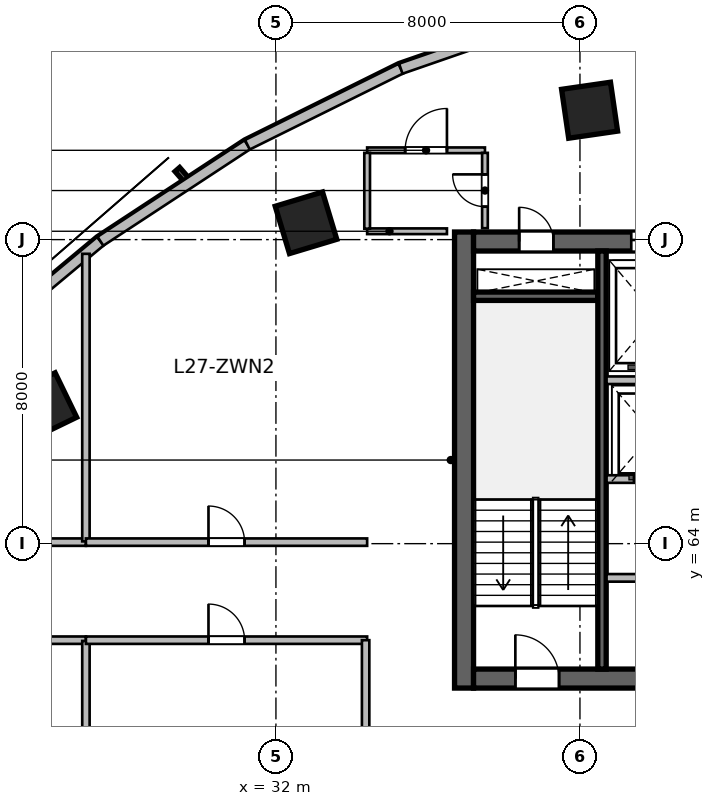
"""IFC4 building model, lengths in metres.
Left out: names, types, materials, properties, quantities, classifications, styles, units other than length and angle.
Written with IfcOpenShell. Run it as: python <this file> out.ifc"""

import sys

from ifc_helpers import new_model, si_unit, direction, frame, frame_2d, origin, origin_2d, place, context, subcontext, project, spatial, rectangle, extrude, source, transform, mapped, element, fill, save


model = new_model("IFC4")
c1 = context("Model", 3, precision=1e-05, world=origin(), true_north=direction((0.0, 1.0)))
c2 = subcontext(c1, "Body", "Model", "MODEL_VIEW")
j1 = project(units=[si_unit("LENGTHUNIT", "METRE"), si_unit("PLANEANGLEUNIT", "RADIAN")], contexts=[c1])
p1 = place(None, origin())
s1 = spatial("IfcSite", under=j1, at=p1, CompositionType="ELEMENT")
p2 = place(p1, origin())
s2 = spatial("IfcBuilding", under=s1, at=p2, CompositionType="ELEMENT")
p3 = place(p2, frame((0.0, 0.0, 115.5)))
s3 = spatial("IfcBuildingStorey", under=s2, at=p3, CompositionType="ELEMENT", Elevation=115.5)
m1 = source(origin(), c2, "Body", "SweptSolid", [
    extrude(rectangle(XDim=12.0, YDim=0.5, at=frame_2d((6.0, 0.0))), origin(), (0.0, 0.0, 1.0), 3.9),
])
p4 = place(p3, frame((36.95, 60.2, 0.0), z_axis=(0.0, 0.0, 1.0), x_axis=(0.0, 1.0, 0.0)))
e1 = element("IfcWall", 1, at=p4, inside=s3, PredefinedType="SHEAR", context=c2, shape_type="MappedRepresentation", body=[
    mapped(m1, transform((0.0, 0.0, 0.0), scale=1.0)),
])
m2 = source(origin(), c2, "Body", "SweptSolid", [
    extrude(rectangle(XDim=21.6, YDim=0.5, at=frame_2d((10.8, 0.0))), origin(), (0.0, 0.0, 1.0), 3.9),
])
p5 = place(p3, frame((37.2, 60.45, 0.0), z_axis=(0.0, 0.0, 1.0), x_axis=(1.0, 0.0, 0.0)))
e2 = element("IfcWall", 2, at=p5, inside=s3, PredefinedType="SHEAR", context=c2, shape_type="MappedRepresentation", body=[
    mapped(m2, transform((0.0, 0.0, 0.0), scale=1.0)),
])
p6 = place(p5, frame((1.1, 0.0, 0.0)))
e3 = element("IfcOpeningElement", 3, at=p6, cuts=e2, PredefinedType="OPENING", context=c2, shape_type="SweptSolid", body=[
    extrude(rectangle(XDim=1.15, YDim=2.15, at=frame_2d((0.575, 1.075))), frame((0.0, 0.26, 0.0), z_axis=(0.0, -1.0, 0.0), x_axis=(1.0, 0.0, 0.0)), (0.0, 0.0, 1.0), 0.52),
])
p7 = place(p5, frame((19.5, 0.0, 0.0)))
e4 = element("IfcOpeningElement", 4, at=p7, cuts=e2, PredefinedType="OPENING", context=c2, shape_type="SweptSolid", body=[
    extrude(rectangle(XDim=0.9, YDim=2.1, at=frame_2d((0.45, 1.05))), frame((0.0, 0.26, 0.0), z_axis=(0.0, -1.0, 0.0), x_axis=(1.0, 0.0, 0.0)), (0.0, 0.0, 1.0), 0.52),
])
p8 = place(p5, frame((12.02, 0.0, 0.0)))
e5 = element("IfcOpeningElement", 5, at=p8, cuts=e2, PredefinedType="OPENING", context=c2, shape_type="SweptSolid", body=[
    extrude(rectangle(XDim=1.6, YDim=2.15, at=frame_2d((0.8, 1.075))), frame((0.0, 0.26, 0.0), z_axis=(0.0, -1.0, 0.0), x_axis=(1.0, 0.0, 0.0)), (0.0, 0.0, 1.0), 0.52),
])
p9 = place(p3, frame((37.2, 71.95, 0.0), z_axis=(0.0, 0.0, 1.0), x_axis=(1.0, 0.0, 0.0)))
e6 = element("IfcWall", 6, at=p9, inside=s3, PredefinedType="SHEAR", context=c2, shape_type="MappedRepresentation", body=[
    mapped(m2, transform((0.0, 0.0, 0.0), scale=1.0)),
])
p10 = place(p9, frame((1.2, 0.0, 0.0)))
e7 = element("IfcOpeningElement", 7, at=p10, cuts=e6, PredefinedType="OPENING", context=c2, shape_type="SweptSolid", body=[
    extrude(rectangle(XDim=0.9, YDim=2.1, at=frame_2d((0.45, 1.05))), frame((0.0, 0.26, 0.0), z_axis=(0.0, -1.0, 0.0), x_axis=(1.0, 0.0, 0.0)), (0.0, 0.0, 1.0), 0.52),
])
p11 = place(p9, frame((14.7, 0.0, 0.0)))
e8 = element("IfcOpeningElement", 8, at=p11, cuts=e6, PredefinedType="OPENING", context=c2, shape_type="SweptSolid", body=[
    extrude(rectangle(XDim=1.2, YDim=2.15, at=frame_2d((0.6, 1.075))), frame((0.0, 0.26, 0.0), z_axis=(0.0, -1.0, 0.0), x_axis=(1.0, 0.0, 0.0)), (0.0, 0.0, 1.0), 0.52),
])
p12 = place(p9, frame((4.15, 0.0, 0.0)))
e9 = element("IfcOpeningElement", 9, at=p12, cuts=e6, PredefinedType="OPENING", context=c2, shape_type="SweptSolid", body=[
    extrude(rectangle(XDim=1.3, YDim=2.15, at=frame_2d((0.65, 1.075))), frame((0.0, 0.26, 0.0), z_axis=(0.0, -1.0, 0.0), x_axis=(1.0, 0.0, 0.0)), (0.0, 0.0, 1.0), 0.52),
])
p13 = place(p9, frame((6.76, 0.0, 0.0)))
e10 = element("IfcOpeningElement", 10, at=p13, cuts=e6, PredefinedType="OPENING", context=c2, shape_type="SweptSolid", body=[
    extrude(rectangle(XDim=0.85, YDim=2.1, at=frame_2d((0.425, 1.05))), frame((0.0, 0.26, 0.0), z_axis=(0.0, -1.0, 0.0), x_axis=(1.0, 0.0, 0.0)), (0.0, 0.0, 1.0), 0.52),
])
p14 = place(p9, frame((8.76, 0.0, 0.0)))
e11 = element("IfcOpeningElement", 11, at=p14, cuts=e6, PredefinedType="OPENING", context=c2, shape_type="SweptSolid", body=[
    extrude(rectangle(XDim=0.85, YDim=2.1, at=frame_2d((0.425, 1.05))), frame((0.0, 0.26, 0.0), z_axis=(0.0, -1.0, 0.0), x_axis=(1.0, 0.0, 0.0)), (0.0, 0.0, 1.0), 0.52),
])
p15 = place(p9, frame((10.725, 0.0, 0.0)))
e12 = element("IfcOpeningElement", 12, at=p15, cuts=e6, PredefinedType="OPENING", context=c2, shape_type="SweptSolid", body=[
    extrude(rectangle(XDim=0.85, YDim=2.1, at=frame_2d((0.425, 1.05))), frame((0.0, 0.26, 0.0), z_axis=(0.0, -1.0, 0.0), x_axis=(1.0, 0.0, 0.0)), (0.0, 0.0, 1.0), 0.52),
])
m3 = source(origin(), c2, "Body", "SweptSolid", [
    extrude(rectangle(XDim=3.27, YDim=0.22, at=frame_2d((1.635, 0.0))), origin(), (0.0, 0.0, 1.0), 3.9),
])
p16 = place(p3, frame((37.2, 70.51, 0.0), z_axis=(0.0, 0.0, 1.0), x_axis=(1.0, 0.0, 0.0)))
e13 = element("IfcWall", 13, at=p16, inside=s3, PredefinedType="SHEAR", context=c2, shape_type="MappedRepresentation", body=[
    mapped(m3, transform((0.0, 0.0, 0.0), scale=1.0)),
])
m4 = source(origin(), c2, "Body", "SweptSolid", [
    extrude(rectangle(XDim=11.0, YDim=0.22, at=frame_2d((5.5, 0.0))), origin(), (0.0, 0.0, 1.0), 3.9),
])
p17 = place(p3, frame((40.58, 60.7, 0.0), z_axis=(0.0, 0.0, 1.0), x_axis=(0.0, 1.0, 0.0)))
e14 = element("IfcWall", 14, at=p17, inside=s3, PredefinedType="SHEAR", context=c2, shape_type="MappedRepresentation", body=[
    mapped(m4, transform((0.0, 0.0, 0.0), scale=1.0)),
])
m5 = source(origin(), c2, "Body", "SweptSolid", [
    extrude(rectangle(XDim=1.3, YDim=1.3, at=origin_2d()), origin(), (0.0, 0.0, 1.0), 3.9),
])
for number, where, z_axis, x_axis in (
    (15, (25.888, 67.627, 0.0), (0.0, 0.0, 1.0), (-0.436, 0.9, 0.0)),
    (16, (32.791, 72.442, 0.0), (0.0, 0.0, 1.0), (-0.289, 0.957, 0.0)),
    (17, (40.253, 75.404, 0.0), (0.0, 0.0, 1.0), (-0.143, 0.99, 0.0)),
):
    element("IfcColumn", number, at=place(p3, frame(where, z_axis=z_axis, x_axis=x_axis)), inside=s3, PredefinedType="COLUMN", context=c2, shape_type="MappedRepresentation", body=[
        mapped(m5, transform((0.0, 0.0, 0.0), scale=1.0)),
    ])
m6 = source(origin(), c2, "Body", "SweptSolid", [
    extrude(rectangle(XDim=4.762, YDim=0.28, at=frame_2d((2.381, 0.0))), origin(), (0.0, 0.0, 1.0), 3.65),
])
p18 = place(p3, frame((23.725, 68.907, 0.0), z_axis=(0.0, 0.0, 1.0), x_axis=(0.767952279762, 0.640507061638, 0.0)))
e18 = element("IfcWall", 18, at=p18, inside=s3, PredefinedType="SOLIDWALL", context=c2, shape_type="MappedRepresentation", body=[
    mapped(m6, transform((0.0, 0.0, 0.0), scale=1.0)),
])
m7 = source(origin(), c2, "Body", "SweptSolid", [
    extrude(rectangle(XDim=4.626, YDim=0.28, at=frame_2d((2.313, 0.0))), origin(), (0.0, 0.0, 1.0), 3.65),
])
p19 = place(p3, frame((27.382, 71.958, 0.0), z_axis=(0.0, 0.0, 1.0), x_axis=(0.83595938331, 0.548791316855, 0.0)))
e19 = element("IfcWall", 19, at=p19, inside=s3, PredefinedType="SOLIDWALL", context=c2, shape_type="MappedRepresentation", body=[
    mapped(m7, transform((0.0, 0.0, 0.0), scale=1.0)),
])
m8 = source(origin(), c2, "Body", "SweptSolid", [
    extrude(rectangle(XDim=4.506, YDim=0.28, at=frame_2d((2.253, 0.0))), origin(), (0.0, 0.0, 1.0), 3.65),
])
p20 = place(p3, frame((31.249, 74.496, 0.0), z_axis=(0.0, 0.0, 1.0), x_axis=(0.89597155075, 0.444111450254, 0.0)))
e20 = element("IfcWall", 20, at=p20, inside=s3, PredefinedType="SOLIDWALL", context=c2, shape_type="MappedRepresentation", body=[
    mapped(m8, transform((0.0, 0.0, 0.0), scale=1.0)),
])
m9 = source(origin(), c2, "Body", "SweptSolid", [
    extrude(rectangle(XDim=4.409, YDim=0.28, at=frame_2d((2.205, 0.0))), origin(), (0.0, 0.0, 1.0), 3.65),
])
p21 = place(p3, frame((35.286, 76.497, 0.0), z_axis=(0.0, 0.0, 1.0), x_axis=(0.944879374121, 0.327418643881, 0.0)))
e21 = element("IfcWall", 21, at=p21, inside=s3, PredefinedType="SOLIDWALL", context=c2, shape_type="MappedRepresentation", body=[
    mapped(m9, transform((0.0, 0.0, 0.0), scale=1.0)),
])
m10 = source(origin(), c2, "Body", "SweptSolid", [
    extrude(rectangle(XDim=8.8, YDim=0.2, at=frame_2d((4.4, 0.0))), origin(), (0.0, 0.0, 1.0), 3.65),
])
p22 = place(p3, frame((40.7, 68.3, 0.0), z_axis=(0.0, 0.0, 1.0), x_axis=(1.0, 0.0, 0.0)))
e22 = element("IfcWall", 22, at=p22, inside=s3, PredefinedType="SOLIDWALL", context=c2, shape_type="MappedRepresentation", body=[
    mapped(m10, transform((0.0, 0.0, 0.0), scale=1.0)),
])
m11 = source(origin(), c2, "Body", "SweptSolid", [
    extrude(rectangle(XDim=8.02, YDim=0.2, at=frame_2d((4.01, 0.0))), origin(), (0.0, 0.0, 1.0), 3.65),
])
p23 = place(p3, frame((40.7, 63.1, 0.0), z_axis=(0.0, 0.0, 1.0), x_axis=(1.0, 0.0, 0.0)))
e23 = element("IfcWall", 23, at=p23, inside=s3, PredefinedType="SOLIDWALL", context=c2, shape_type="MappedRepresentation", body=[
    mapped(m11, transform((0.0, 0.0, 0.0), scale=1.0)),
])
p24 = place(p23, frame((2.15, 0.0, 0.0)))
e24 = element("IfcOpeningElement", 24, at=p24, cuts=e23, PredefinedType="OPENING", context=c2, shape_type="SweptSolid", body=[
    extrude(rectangle(XDim=0.9, YDim=2.1, at=frame_2d((0.45, 1.05))), frame((0.0, 0.11, 0.0), z_axis=(0.0, -1.0, 0.0), x_axis=(1.0, 0.0, 0.0)), (0.0, 0.0, 1.0), 0.22),
])
p25 = place(p23, frame((6.09, 0.0, 0.0)))
e25 = element("IfcOpeningElement", 25, at=p25, cuts=e23, PredefinedType="OPENING", context=c2, shape_type="SweptSolid", body=[
    extrude(rectangle(XDim=0.9, YDim=2.1, at=frame_2d((0.45, 1.05))), frame((0.0, 0.11, 0.0), z_axis=(0.0, -1.0, 0.0), x_axis=(1.0, 0.0, 0.0)), (0.0, 0.0, 1.0), 0.22),
])
p26 = place(p3, frame((40.7, 65.7, 0.0), z_axis=(0.0, 0.0, 1.0), x_axis=(1.0, 0.0, 0.0)))
e26 = element("IfcWall", 26, at=p26, inside=s3, PredefinedType="SOLIDWALL", context=c2, shape_type="MappedRepresentation", body=[
    mapped(m10, transform((0.0, 0.0, 0.0), scale=1.0)),
])
p27 = place(p26, frame((0.72, 0.0, 0.0)))
e27 = element("IfcOpeningElement", 27, at=p27, cuts=e26, PredefinedType="OPENING", context=c2, shape_type="SweptSolid", body=[
    extrude(rectangle(XDim=1.0, YDim=2.15, at=frame_2d((0.5, 1.075))), frame((0.0, 0.11, 0.0), z_axis=(0.0, -1.0, 0.0), x_axis=(1.0, 0.0, 0.0)), (0.0, 0.0, 1.0), 0.22),
])
p28 = place(p26, frame((2.62, 0.0, 0.0)))
e28 = element("IfcOpeningElement", 28, at=p28, cuts=e26, PredefinedType="OPENING", context=c2, shape_type="SweptSolid", body=[
    extrude(rectangle(XDim=1.0, YDim=2.15, at=frame_2d((0.5, 1.075))), frame((0.0, 0.11, 0.0), z_axis=(0.0, -1.0, 0.0), x_axis=(1.0, 0.0, 0.0)), (0.0, 0.0, 1.0), 0.22),
])
p29 = place(p26, frame((4.55, 0.0, 0.0)))
e29 = element("IfcOpeningElement", 29, at=p29, cuts=e26, PredefinedType="OPENING", context=c2, shape_type="SweptSolid", body=[
    extrude(rectangle(XDim=1.0, YDim=2.15, at=frame_2d((0.5, 1.075))), frame((0.0, 0.11, 0.0), z_axis=(0.0, -1.0, 0.0), x_axis=(1.0, 0.0, 0.0)), (0.0, 0.0, 1.0), 0.22),
])
p30 = place(p26, frame((6.55, 0.0, 0.0)))
e30 = element("IfcOpeningElement", 30, at=p30, cuts=e26, PredefinedType="OPENING", context=c2, shape_type="SweptSolid", body=[
    extrude(rectangle(XDim=1.0, YDim=2.15, at=frame_2d((0.5, 1.075))), frame((0.0, 0.11, 0.0), z_axis=(0.0, -1.0, 0.0), x_axis=(1.0, 0.0, 0.0)), (0.0, 0.0, 1.0), 0.22),
])
m12 = source(origin(), c2, "Body", "SweptSolid", [
    extrude(rectangle(XDim=2.1, YDim=0.15, at=frame_2d((1.05, 0.0))), origin(), (0.0, 0.0, 1.0), 3.65),
])
p31 = place(p3, frame((34.4, 72.22, 0.0), z_axis=(0.0, 0.0, 1.0), x_axis=(1.0, 0.0, 0.0)))
e31 = element("IfcWall", 31, at=p31, inside=s3, PredefinedType="PARTITIONING", context=c2, shape_type="MappedRepresentation", body=[
    mapped(m12, transform((0.0, 0.0, 0.0), scale=1.0)),
])
m13 = source(origin(), c2, "Body", "SweptSolid", [
    extrude(rectangle(XDim=3.1, YDim=0.15, at=frame_2d((1.55, 0.0))), origin(), (0.0, 0.0, 1.0), 3.022),
])
p32 = place(p3, frame((34.4, 74.35, 0.0), z_axis=(0.0, 0.0, 1.0), x_axis=(1.0, 0.0, 0.0)))
e32 = element("IfcWall", 32, at=p32, inside=s3, PredefinedType="PARTITIONING", context=c2, shape_type="MappedRepresentation", body=[
    mapped(m13, transform((0.0, 0.0, 0.0), scale=1.0)),
])
p33 = place(p32, frame((1.0, 0.0, 0.0)))
e33 = element("IfcOpeningElement", 33, at=p33, cuts=e32, PredefinedType="OPENING", context=c2, shape_type="SweptSolid", body=[
    extrude(rectangle(XDim=1.1, YDim=2.15, at=frame_2d((0.55, 1.075))), frame((0.0, 0.085, 0.0), z_axis=(0.0, -1.0, 0.0), x_axis=(1.0, 0.0, 0.0)), (0.0, 0.0, 1.0), 0.17),
])
m14 = source(origin(), c2, "Body", "SweptSolid", [
    extrude(rectangle(XDim=1.995, YDim=0.15, at=frame_2d((0.998, 0.0))), origin(), (0.0, 0.0, 1.0), 3.65),
])
p34 = place(p3, frame((34.4, 72.288, 0.0), z_axis=(0.0, 0.0, 1.0), x_axis=(0.0, 1.0, 0.0)))
e34 = element("IfcWall", 34, at=p34, inside=s3, PredefinedType="PARTITIONING", context=c2, shape_type="MappedRepresentation", body=[
    mapped(m14, transform((0.0, 0.0, 0.0), scale=1.0)),
])
m15 = source(origin(), c2, "Body", "SweptSolid", [
    extrude(rectangle(XDim=1.982, YDim=0.15, at=frame_2d((0.991, 0.0))), origin(), (0.0, 0.0, 1.0), 3.65),
])
p35 = place(p3, frame((37.5, 72.3, 0.0), z_axis=(0.0, 0.0, 1.0), x_axis=(0.0, 1.0, 0.0)))
e35 = element("IfcWall", 35, at=p35, inside=s3, PredefinedType="PARTITIONING", context=c2, shape_type="MappedRepresentation", body=[
    mapped(m15, transform((0.0, 0.0, 0.0), scale=1.0)),
])
p36 = place(p35, frame((0.566, 0.0, 0.0)))
e36 = element("IfcOpeningElement", 36, at=p36, cuts=e35, PredefinedType="OPENING", context=c2, shape_type="SweptSolid", body=[
    extrude(rectangle(XDim=0.85, YDim=2.1, at=frame_2d((0.425, 1.05))), frame((0.0, 0.085, 0.0), z_axis=(0.0, -1.0, 0.0), x_axis=(1.0, 0.0, 0.0)), (0.0, 0.0, 1.0), 0.17),
])
m16 = source(origin(), c2, "Body", "SweptSolid", [
    extrude(rectangle(XDim=3.82, YDim=0.195, at=frame_2d((1.91, 0.0))), origin(), (0.0, 0.0, 1.0), 3.65),
])
p37 = place(p3, frame((23.18, 64.04, 0.0), z_axis=(0.0, 0.0, 1.0), x_axis=(1.0, 0.0, 0.0)))
e37 = element("IfcWall", 37, at=p37, inside=s3, PredefinedType="PARTITIONING", context=c2, shape_type="MappedRepresentation", body=[
    mapped(m16, transform((0.0, 0.0, 0.0), scale=1.0)),
])
p38 = place(p37, frame((1.435, 0.0, 0.0)))
e38 = element("IfcOpeningElement", 38, at=p38, cuts=e37, PredefinedType="OPENING", context=c2, shape_type="SweptSolid", body=[
    extrude(rectangle(XDim=0.95, YDim=2.1, at=frame_2d((0.475, 1.05))), frame((0.0, 0.107, 0.0), z_axis=(0.0, -1.0, 0.0), x_axis=(1.0, 0.0, 0.0)), (0.0, 0.0, 1.0), 0.215),
])
m17 = source(origin(), c2, "Body", "SweptSolid", [
    extrude(rectangle(XDim=7.566, YDim=0.195, at=frame_2d((3.783, 0.0))), origin(), (0.0, 0.0, 1.0), 2.942),
])
p39 = place(p3, frame((27.0, 64.06, 0.0), z_axis=(0.0, 0.0, 1.0), x_axis=(0.0, 1.0, 0.0)))
e39 = element("IfcWall", 39, at=p39, inside=s3, PredefinedType="PARTITIONING", context=c2, shape_type="MappedRepresentation", body=[
    mapped(m17, transform((0.0, 0.0, 0.0), scale=1.0)),
])
m18 = source(origin(), c2, "Body", "SweptSolid", [
    extrude(rectangle(XDim=7.4, YDim=0.195, at=frame_2d((3.7, 0.0))), origin(), (0.0, 0.0, 1.0), 3.65),
])
p40 = place(p3, frame((27.0, 64.04, 0.0), z_axis=(0.0, 0.0, 1.0), x_axis=(1.0, 0.0, 0.0)))
e40 = element("IfcWall", 40, at=p40, inside=s3, PredefinedType="PARTITIONING", context=c2, shape_type="MappedRepresentation", body=[
    mapped(m18, transform((0.0, 0.0, 0.0), scale=1.0)),
])
p41 = place(p40, frame((3.225, 0.0, 0.0)))
e41 = element("IfcOpeningElement", 41, at=p41, cuts=e40, PredefinedType="OPENING", context=c2, shape_type="SweptSolid", body=[
    extrude(rectangle(XDim=0.95, YDim=2.1, at=frame_2d((0.475, 1.05))), frame((0.0, 0.107, 0.0), z_axis=(0.0, -1.0, 0.0), x_axis=(1.0, 0.0, 0.0)), (0.0, 0.0, 1.0), 0.215),
])
p42 = place(p3, frame((23.18, 61.46, 0.0), z_axis=(0.0, 0.0, 1.0), x_axis=(1.0, 0.0, 0.0)))
e42 = element("IfcWall", 42, at=p42, inside=s3, PredefinedType="PARTITIONING", context=c2, shape_type="MappedRepresentation", body=[
    mapped(m16, transform((0.0, 0.0, 0.0), scale=1.0)),
])
p43 = place(p42, frame((1.435, 0.0, 0.0)))
e43 = element("IfcOpeningElement", 43, at=p43, cuts=e42, PredefinedType="OPENING", context=c2, shape_type="SweptSolid", body=[
    extrude(rectangle(XDim=0.95, YDim=2.1, at=frame_2d((0.475, 1.05))), frame((0.0, 0.107, 0.0), z_axis=(0.0, -1.0, 0.0), x_axis=(1.0, 0.0, 0.0)), (0.0, 0.0, 1.0), 0.215),
])
m19 = source(origin(), c2, "Body", "SweptSolid", [
    extrude(rectangle(XDim=23.771, YDim=0.195, at=frame_2d((11.886, 0.0))), origin(), (0.0, 0.0, 1.0), 2.942),
])
p44 = place(p3, frame((27.0, 37.668, 0.0), z_axis=(0.0, 0.0, 1.0), x_axis=(0.0, 1.0, 0.0)))
e44 = element("IfcWall", 44, at=p44, inside=s3, PredefinedType="PARTITIONING", context=c2, shape_type="MappedRepresentation", body=[
    mapped(m19, transform((0.0, 0.0, 0.0), scale=1.0)),
])
p45 = place(p3, frame((27.0, 61.46, 0.0), z_axis=(0.0, 0.0, 1.0), x_axis=(1.0, 0.0, 0.0)))
e45 = element("IfcWall", 45, at=p45, inside=s3, PredefinedType="PARTITIONING", context=c2, shape_type="MappedRepresentation", body=[
    mapped(m18, transform((0.0, 0.0, 0.0), scale=1.0)),
])
p46 = place(p45, frame((3.225, 0.0, 0.0)))
e46 = element("IfcOpeningElement", 46, at=p46, cuts=e45, PredefinedType="OPENING", context=c2, shape_type="SweptSolid", body=[
    extrude(rectangle(XDim=0.95, YDim=2.1, at=frame_2d((0.475, 1.05))), frame((0.0, 0.107, 0.0), z_axis=(0.0, -1.0, 0.0), x_axis=(1.0, 0.0, 0.0)), (0.0, 0.0, 1.0), 0.215),
])
m20 = source(origin(), c2, "Body", "SweptSolid", [
    extrude(rectangle(XDim=13.988, YDim=0.195, at=frame_2d((6.994, 0.0))), origin(), (0.0, 0.0, 1.0), 3.65),
])
p47 = place(p3, frame((34.36, 47.472, 0.0), z_axis=(0.0, 0.0, 1.0), x_axis=(0.0, 1.0, 0.0)))
e47 = element("IfcWall", 47, at=p47, inside=s3, PredefinedType="PARTITIONING", context=c2, shape_type="MappedRepresentation", body=[
    mapped(m20, transform((0.0, 0.0, 0.0), scale=1.0)),
])
m21 = source(origin(), c2, "Body", "SweptSolid", [
    extrude(rectangle(XDim=1.15, YDim=2.15, at=frame_2d((0.575, 1.075))), frame((0.0, 0.025, 0.0), z_axis=(0.0, -1.0, 0.0), x_axis=(1.0, 0.0, 0.0)), (0.0, 0.0, 1.0), 0.05),
])
p48 = place(p6, origin())
e48 = element("IfcDoor", 48, at=p48, inside=s3, OperationType="SINGLE_SWING_LEFT", PredefinedType="DOOR", context=c2, shape_type="MappedRepresentation", body=[
    mapped(m21, transform((0.0, 0.0, 0.0), scale=1.0)),
])
fill(e3, e48)
m22 = source(origin(), c2, "Body", "SweptSolid", [
    extrude(rectangle(XDim=0.9, YDim=2.1, at=frame_2d((0.45, 1.05))), frame((0.0, 0.025, 0.0), z_axis=(0.0, -1.0, 0.0), x_axis=(1.0, 0.0, 0.0)), (0.0, 0.0, 1.0), 0.05),
])
p49 = place(p10, origin())
e49 = element("IfcDoor", 49, at=p49, inside=s3, OperationType="SINGLE_SWING_LEFT", PredefinedType="DOOR", context=c2, shape_type="MappedRepresentation", body=[
    mapped(m22, transform((0.0, 0.0, 0.0), scale=1.0)),
])
fill(e7, e49)
m23 = source(origin(), c2, "Body", "SweptSolid", [
    extrude(rectangle(XDim=1.3, YDim=2.15, at=frame_2d((0.65, 1.075))), frame((0.0, 0.025, 0.0), z_axis=(0.0, -1.0, 0.0), x_axis=(1.0, 0.0, 0.0)), (0.0, 0.0, 1.0), 0.05),
])
p50 = place(p12, origin())
e50 = element("IfcDoor", 50, at=p50, inside=s3, OperationType="DOUBLE_DOOR_SLIDING", PredefinedType="DOOR", context=c2, shape_type="MappedRepresentation", body=[
    mapped(m23, transform((0.0, 0.0, 0.0), scale=1.0)),
])
fill(e9, e50)
m24 = source(origin(), c2, "Body", "SweptSolid", [
    extrude(rectangle(XDim=1.0, YDim=2.15, at=frame_2d((0.5, 1.075))), frame((0.0, 0.025, 0.0), z_axis=(0.0, -1.0, 0.0), x_axis=(1.0, 0.0, 0.0)), (0.0, 0.0, 1.0), 0.05),
])
p51 = place(p27, origin())
e51 = element("IfcDoor", 51, at=p51, inside=s3, OperationType="DOUBLE_DOOR_SLIDING", PredefinedType="DOOR", context=c2, shape_type="MappedRepresentation", body=[
    mapped(m24, transform((0.0, 0.0, 0.0), scale=1.0)),
])
fill(e27, e51)
m25 = source(origin(), c2, "Body", "SweptSolid", [
    extrude(rectangle(XDim=0.85, YDim=2.1, at=frame_2d((0.425, 1.05))), frame((0.0, 0.025, 0.0), z_axis=(0.0, -1.0, 0.0), x_axis=(1.0, 0.0, 0.0)), (0.0, 0.0, 1.0), 0.05),
])
p52 = place(p36, origin())
e52 = element("IfcDoor", 52, at=p52, inside=s3, OperationType="SINGLE_SWING_RIGHT", PredefinedType="DOOR", context=c2, shape_type="MappedRepresentation", body=[
    mapped(m25, transform((0.0, 0.0, 0.0), scale=1.0)),
])
fill(e36, e52)
m26 = source(origin(), c2, "Body", "SweptSolid", [
    extrude(rectangle(XDim=1.1, YDim=2.15, at=frame_2d((0.55, 1.075))), frame((0.0, 0.025, 0.0), z_axis=(0.0, -1.0, 0.0), x_axis=(1.0, 0.0, 0.0)), (0.0, 0.0, 1.0), 0.05),
])
p53 = place(p33, origin())
e53 = element("IfcDoor", 53, at=p53, inside=s3, OperationType="SINGLE_SWING_RIGHT", PredefinedType="DOOR", context=c2, shape_type="MappedRepresentation", body=[
    mapped(m26, transform((0.0, 0.0, 0.0), scale=1.0)),
])
fill(e33, e53)
m27 = source(origin(), c2, "Body", "SweptSolid", [
    extrude(rectangle(XDim=0.95, YDim=2.1, at=frame_2d((0.475, 1.05))), frame((0.0, 0.025, 0.0), z_axis=(0.0, -1.0, 0.0), x_axis=(1.0, 0.0, 0.0)), (0.0, 0.0, 1.0), 0.05),
])
p54 = place(p41, origin())
e54 = element("IfcDoor", 54, at=p54, inside=s3, OperationType="SINGLE_SWING_LEFT", PredefinedType="DOOR", context=c2, shape_type="MappedRepresentation", body=[
    mapped(m27, transform((0.0, 0.0, 0.0), scale=1.0)),
])
fill(e41, e54)
p55 = place(p46, origin())
e55 = element("IfcDoor", 55, at=p55, inside=s3, OperationType="SINGLE_SWING_LEFT", PredefinedType="DOOR", context=c2, shape_type="MappedRepresentation", body=[
    mapped(m27, transform((0.0, 0.0, 0.0), scale=1.0)),
])
fill(e46, e55)
save(model, sys.argv[1])
